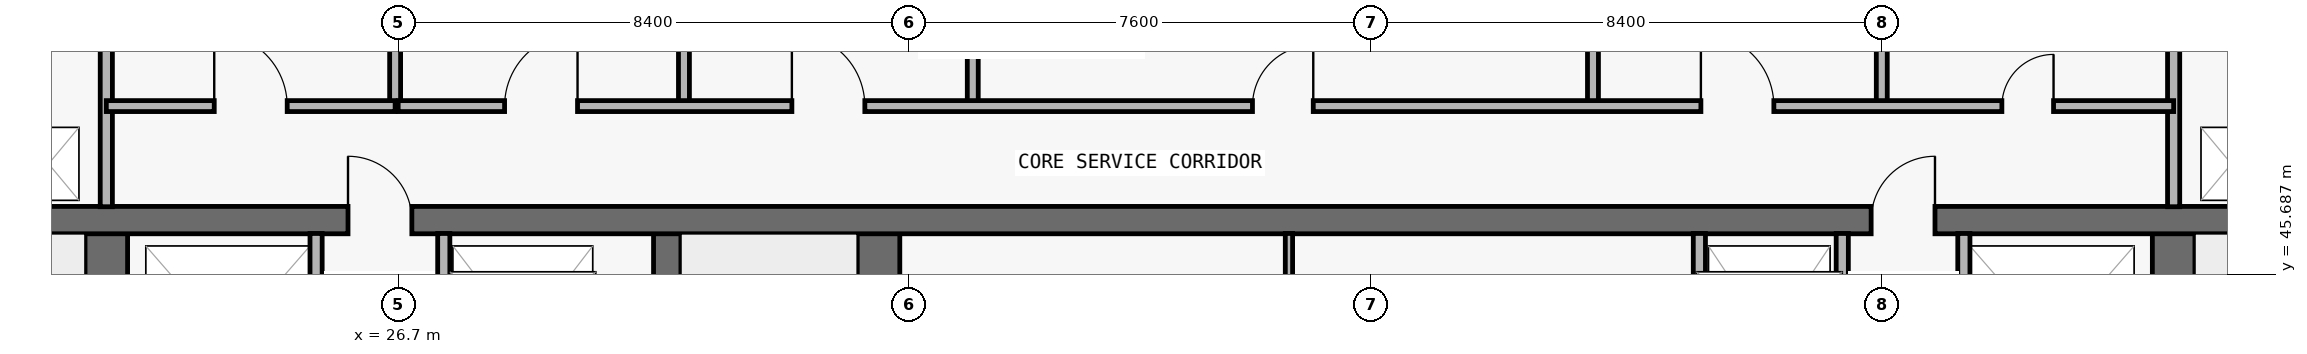
"""IFC4 building model, lengths in metres.
Left out: names, types, materials, properties, quantities, classifications, styles, units other than length and angle.
Written with IfcOpenShell. Run it as: python <this file> out.ifc"""

import sys

from ifc_helpers import new_model, si_unit, direction, frame, frame_2d, origin, place, context, subcontext, project, spatial, rectangle, extrude, element, fill, save


model = new_model("IFC4")
c1 = context("Model", 3, precision=1e-05, world=origin(), true_north=direction((0.0, 1.0)))
c2 = subcontext(c1, "Body", "Model", "MODEL_VIEW")
j1 = project(units=[si_unit("LENGTHUNIT", "METRE"), si_unit("PLANEANGLEUNIT", "RADIAN")], contexts=[c1])
p1 = place(None, origin())
s1 = spatial("IfcSite", under=j1, at=p1, CompositionType="ELEMENT")
p2 = place(p1, origin())
s2 = spatial("IfcBuilding", under=s1, at=p2, CompositionType="ELEMENT")
p3 = place(p2, frame((0.0, 0.0, 252.9)))
s3 = spatial("IfcBuildingStorey", under=s2, at=p3, CompositionType="ELEMENT", Elevation=252.9)
p4 = place(p3, frame((21.9, 37.0, 0.0), z_axis=(0.0, 0.0, 1.0), x_axis=(0.0, 1.0, 0.0)))
e1 = element("IfcWall", 1, at=p4, inside=s3, PredefinedType="SHEAR", context=c2, shape_type="SweptSolid", body=[
    extrude(rectangle(XDim=9.575, YDim=0.7, at=frame_2d((4.788, 0.0))), origin(), (0.0, 0.0, 1.0), 3.05),
])
p5 = place(p4, frame((0.55, 0.0, 0.0)))
e2 = element("IfcOpeningElement", 2, at=p5, cuts=e1, PredefinedType="OPENING", context=c2, shape_type="SweptSolid", body=[
    extrude(rectangle(XDim=1.1, YDim=2.15, at=frame_2d((0.55, 1.075))), frame((0.0, 0.36, 0.0), z_axis=(0.0, -1.0, 0.0), x_axis=(1.0, 0.0, 0.0)), (0.0, 0.0, 1.0), 0.72),
])
p6 = place(p3, frame((55.9, 37.0, 0.0), z_axis=(0.0, 0.0, 1.0), x_axis=(0.0, 1.0, 0.0)))
e3 = element("IfcWall", 3, at=p6, inside=s3, PredefinedType="SHEAR", context=c2, shape_type="SweptSolid", body=[
    extrude(rectangle(XDim=9.575, YDim=0.7, at=frame_2d((4.788, 0.0))), origin(), (0.0, 0.0, 1.0), 3.05),
])
p7 = place(p6, frame((0.55, 0.0, 0.0)))
e4 = element("IfcOpeningElement", 4, at=p7, cuts=e3, PredefinedType="OPENING", context=c2, shape_type="SweptSolid", body=[
    extrude(rectangle(XDim=1.1, YDim=2.15, at=frame_2d((0.55, 1.075))), frame((0.0, 0.36, 0.0), z_axis=(0.0, -1.0, 0.0), x_axis=(1.0, 0.0, 0.0)), (0.0, 0.0, 1.0), 0.72),
])
p8 = place(p3, frame((31.125, 37.0, 0.0), z_axis=(0.0, 0.0, 1.0), x_axis=(0.0, 1.0, 0.0)))
e5 = element("IfcWall", 5, at=p8, inside=s3, PredefinedType="SHEAR", context=c2, shape_type="SweptSolid", body=[
    extrude(rectangle(XDim=9.575, YDim=0.45, at=frame_2d((4.788, 0.0))), origin(), (0.0, 0.0, 1.0), 3.05),
])
p9 = place(p3, frame((34.6, 37.0, 0.0), z_axis=(0.0, 0.0, 1.0), x_axis=(0.0, 1.0, 0.0)))
e6 = element("IfcWall", 6, at=p9, inside=s3, PredefinedType="SHEAR", context=c2, shape_type="SweptSolid", body=[
    extrude(rectangle(XDim=9.575, YDim=0.7, at=frame_2d((4.788, 0.0))), origin(), (0.0, 0.0, 1.0), 3.05),
])
p10 = place(p3, frame((18.3, 46.575, 0.0), z_axis=(0.0, 0.0, 1.0), x_axis=(1.0, 0.0, 0.0)))
e7 = element("IfcWall", 7, at=p10, inside=s3, PredefinedType="SHEAR", context=c2, shape_type="SweptSolid", body=[
    extrude(rectangle(XDim=41.2, YDim=0.45, at=frame_2d((20.6, 0.0))), origin(), (0.0, 0.0, 1.0), 3.05),
])
p11 = place(p10, frame((7.575, 0.0, 0.0)))
e8 = element("IfcOpeningElement", 8, at=p11, cuts=e7, PredefinedType="OPENING", context=c2, shape_type="SweptSolid", body=[
    extrude(rectangle(XDim=1.05, YDim=2.15, at=frame_2d((0.525, 1.075))), frame((0.0, 0.235, 0.0), z_axis=(0.0, -1.0, 0.0), x_axis=(1.0, 0.0, 0.0)), (0.0, 0.0, 1.0), 0.47),
])
p12 = place(p10, frame((32.625, 0.0, 0.0)))
e9 = element("IfcOpeningElement", 9, at=p12, cuts=e7, PredefinedType="OPENING", context=c2, shape_type="SweptSolid", body=[
    extrude(rectangle(XDim=1.05, YDim=2.15, at=frame_2d((0.525, 1.075))), frame((0.0, 0.235, 0.0), z_axis=(0.0, -1.0, 0.0), x_axis=(1.0, 0.0, 0.0)), (0.0, 0.0, 1.0), 0.47),
])
p13 = place(p3, frame((21.9, 46.795, 0.0), z_axis=(0.0, 0.0, 1.0), x_axis=(0.0, 1.0, 0.0)))
e10 = element("IfcWall", 10, at=p13, inside=s3, PredefinedType="PARTITIONING", context=c2, shape_type="SweptSolid", body=[
    extrude(rectangle(XDim=3.16, YDim=0.2, at=frame_2d((1.58, 0.0))), origin(), (0.0, 0.0, 1.0), 3.05),
])
p14 = place(p3, frame((25.35, 43.17, 0.0), z_axis=(0.0, 0.0, 1.0), x_axis=(0.0, 1.0, 0.0)))
e11 = element("IfcWall", 11, at=p14, inside=s3, PredefinedType="PARTITIONING", context=c2, shape_type="SweptSolid", body=[
    extrude(rectangle(XDim=3.185, YDim=0.2, at=frame_2d((1.593, 0.0))), origin(), (0.0, 0.0, 1.0), 3.05),
])
p15 = place(p3, frame((26.65, 48.45, 0.0), z_axis=(0.0, 0.0, 1.0), x_axis=(0.0, 1.0, 0.0)))
e12 = element("IfcWall", 12, at=p15, inside=s3, PredefinedType="PARTITIONING", context=c2, shape_type="SweptSolid", body=[
    extrude(rectangle(XDim=1.505, YDim=0.18, at=frame_2d((0.752, 0.0))), origin(), (0.0, 0.0, 1.0), 3.05),
])
p16 = place(p3, frame((27.45, 43.17, 0.0), z_axis=(0.0, 0.0, 1.0), x_axis=(0.0, 1.0, 0.0)))
e13 = element("IfcWall", 13, at=p16, inside=s3, PredefinedType="PARTITIONING", context=c2, shape_type="SweptSolid", body=[
    extrude(rectangle(XDim=3.185, YDim=0.2, at=frame_2d((1.593, 0.0))), origin(), (0.0, 0.0, 1.0), 3.05),
])
for number, where, z_axis, x_axis in (
    (14, (31.4, 48.45, 0.0), (0.0, 0.0, 1.0), (0.0, 1.0, 0.0)),
    (15, (36.15, 48.45, 0.0), (0.0, 0.0, 1.0), (0.0, 1.0, 0.0)),
):
    element("IfcWall", number, at=place(p3, frame(where, z_axis=z_axis, x_axis=x_axis)), inside=s3, PredefinedType="PARTITIONING", context=c2, shape_type="SweptSolid", body=[
        extrude(rectangle(XDim=1.505, YDim=0.18, at=frame_2d((0.752, 0.0))), origin(), (0.0, 0.0, 1.0), 3.05),
    ])
p17 = place(p3, frame((41.35, 43.17, 0.0), z_axis=(0.0, 0.0, 1.0), x_axis=(0.0, 1.0, 0.0)))
e16 = element("IfcWall", 16, at=p17, inside=s3, PredefinedType="PARTITIONING", context=c2, shape_type="SweptSolid", body=[
    extrude(rectangle(XDim=3.185, YDim=0.12, at=frame_2d((1.593, 0.0))), origin(), (0.0, 0.0, 1.0), 3.05),
])
p18 = place(p3, frame((46.35, 48.45, 0.0), z_axis=(0.0, 0.0, 1.0), x_axis=(0.0, 1.0, 0.0)))
e17 = element("IfcWall", 17, at=p18, inside=s3, PredefinedType="PARTITIONING", context=c2, shape_type="SweptSolid", body=[
    extrude(rectangle(XDim=1.505, YDim=0.18, at=frame_2d((0.752, 0.0))), origin(), (0.0, 0.0, 1.0), 3.05),
])
for number, where, z_axis, x_axis in (
    (18, (48.1, 43.17, 0.0), (0.0, 0.0, 1.0), (0.0, 1.0, 0.0)),
    (19, (50.45, 43.17, 0.0), (0.0, 0.0, 1.0), (0.0, 1.0, 0.0)),
):
    element("IfcWall", number, at=place(p3, frame(where, z_axis=z_axis, x_axis=x_axis)), inside=s3, PredefinedType="PARTITIONING", context=c2, shape_type="SweptSolid", body=[
        extrude(rectangle(XDim=3.185, YDim=0.2, at=frame_2d((1.593, 0.0))), origin(), (0.0, 0.0, 1.0), 3.05),
    ])
p19 = place(p3, frame((51.1, 48.45, 0.0), z_axis=(0.0, 0.0, 1.0), x_axis=(0.0, 1.0, 0.0)))
e20 = element("IfcWall", 20, at=p19, inside=s3, PredefinedType="PARTITIONING", context=c2, shape_type="SweptSolid", body=[
    extrude(rectangle(XDim=1.505, YDim=0.18, at=frame_2d((0.752, 0.0))), origin(), (0.0, 0.0, 1.0), 3.05),
])
p20 = place(p3, frame((52.45, 43.17, 0.0), z_axis=(0.0, 0.0, 1.0), x_axis=(0.0, 1.0, 0.0)))
e21 = element("IfcWall", 21, at=p20, inside=s3, PredefinedType="PARTITIONING", context=c2, shape_type="SweptSolid", body=[
    extrude(rectangle(XDim=3.185, YDim=0.2, at=frame_2d((1.593, 0.0))), origin(), (0.0, 0.0, 1.0), 3.05),
])
p21 = place(p3, frame((55.9, 46.795, 0.0), z_axis=(0.0, 0.0, 1.0), x_axis=(0.0, 1.0, 0.0)))
e22 = element("IfcWall", 22, at=p21, inside=s3, PredefinedType="PARTITIONING", context=c2, shape_type="SweptSolid", body=[
    extrude(rectangle(XDim=3.16, YDim=0.2, at=frame_2d((1.58, 0.0))), origin(), (0.0, 0.0, 1.0), 3.05),
])
p22 = place(p3, frame((21.9, 48.45, 0.0), z_axis=(0.0, 0.0, 1.0), x_axis=(1.0, 0.0, 0.0)))
e23 = element("IfcWall", 23, at=p22, inside=s3, PredefinedType="PARTITIONING", context=c2, shape_type="SweptSolid", body=[
    extrude(rectangle(XDim=4.75, YDim=0.18, at=frame_2d((2.375, 0.0))), origin(), (0.0, 0.0, 1.0), 3.05),
])
p23 = place(p22, frame((1.775, 0.0, 0.0)))
e24 = element("IfcOpeningElement", 24, at=p23, cuts=e23, PredefinedType="OPENING", context=c2, shape_type="SweptSolid", body=[
    extrude(rectangle(XDim=1.2, YDim=2.2, at=frame_2d((0.6, 1.1))), frame((0.0, 0.1, 0.0), z_axis=(0.0, -1.0, 0.0), x_axis=(1.0, 0.0, 0.0)), (0.0, 0.0, 1.0), 0.2),
])
p24 = place(p3, frame((26.7, 48.45, 0.0), z_axis=(0.0, 0.0, 1.0), x_axis=(1.0, 0.0, 0.0)))
e25 = element("IfcWall", 25, at=p24, inside=s3, PredefinedType="PARTITIONING", context=c2, shape_type="SweptSolid", body=[
    extrude(rectangle(XDim=29.2, YDim=0.18, at=frame_2d((14.6, 0.0))), origin(), (0.0, 0.0, 1.0), 3.05),
])
p25 = place(p24, frame((1.75, 0.0, 0.0)))
e26 = element("IfcOpeningElement", 26, at=p25, cuts=e25, PredefinedType="OPENING", context=c2, shape_type="SweptSolid", body=[
    extrude(rectangle(XDim=1.2, YDim=2.2, at=frame_2d((0.6, 1.1))), frame((0.0, 0.1, 0.0), z_axis=(0.0, -1.0, 0.0), x_axis=(1.0, 0.0, 0.0)), (0.0, 0.0, 1.0), 0.2),
])
p26 = place(p24, frame((6.475, 0.0, 0.0)))
e27 = element("IfcOpeningElement", 27, at=p26, cuts=e25, PredefinedType="OPENING", context=c2, shape_type="SweptSolid", body=[
    extrude(rectangle(XDim=1.2, YDim=2.2, at=frame_2d((0.6, 1.1))), frame((0.0, 0.1, 0.0), z_axis=(0.0, -1.0, 0.0), x_axis=(1.0, 0.0, 0.0)), (0.0, 0.0, 1.0), 0.2),
])
p27 = place(p24, frame((14.05, 0.0, 0.0)))
e28 = element("IfcOpeningElement", 28, at=p27, cuts=e25, PredefinedType="OPENING", context=c2, shape_type="SweptSolid", body=[
    extrude(rectangle(XDim=1.0, YDim=2.2, at=frame_2d((0.5, 1.1))), frame((0.0, 0.1, 0.0), z_axis=(0.0, -1.0, 0.0), x_axis=(1.0, 0.0, 0.0)), (0.0, 0.0, 1.0), 0.2),
])
p28 = place(p24, frame((21.425, 0.0, 0.0)))
e29 = element("IfcOpeningElement", 29, at=p28, cuts=e25, PredefinedType="OPENING", context=c2, shape_type="SweptSolid", body=[
    extrude(rectangle(XDim=1.2, YDim=2.2, at=frame_2d((0.6, 1.1))), frame((0.0, 0.1, 0.0), z_axis=(0.0, -1.0, 0.0), x_axis=(1.0, 0.0, 0.0)), (0.0, 0.0, 1.0), 0.2),
])
p29 = place(p24, frame((26.375, 0.0, 0.0)))
e30 = element("IfcOpeningElement", 30, at=p29, cuts=e25, PredefinedType="OPENING", context=c2, shape_type="SweptSolid", body=[
    extrude(rectangle(XDim=0.85, YDim=2.1, at=frame_2d((0.425, 1.05))), frame((0.0, 0.1, 0.0), z_axis=(0.0, -1.0, 0.0), x_axis=(1.0, 0.0, 0.0)), (0.0, 0.0, 1.0), 0.2),
])
p30 = place(p11, origin())
e31 = element("IfcDoor", 31, at=p30, inside=s3, OperationType="SINGLE_SWING_LEFT", PredefinedType="DOOR", context=c2, shape_type="SweptSolid", body=[
    extrude(rectangle(XDim=1.05, YDim=2.15, at=frame_2d((0.525, 1.075))), frame((0.0, 0.025, 0.0), z_axis=(0.0, -1.0, 0.0), x_axis=(1.0, 0.0, 0.0)), (0.0, 0.0, 1.0), 0.05),
])
fill(e8, e31)
p31 = place(p12, origin())
e32 = element("IfcDoor", 32, at=p31, inside=s3, OperationType="SINGLE_SWING_RIGHT", PredefinedType="DOOR", context=c2, shape_type="SweptSolid", body=[
    extrude(rectangle(XDim=1.05, YDim=2.15, at=frame_2d((0.525, 1.075))), frame((0.0, 0.025, 0.0), z_axis=(0.0, -1.0, 0.0), x_axis=(1.0, 0.0, 0.0)), (0.0, 0.0, 1.0), 0.05),
])
fill(e9, e32)
p32 = place(p23, origin())
e33 = element("IfcDoor", 33, at=p32, inside=s3, OperationType="SINGLE_SWING_LEFT", PredefinedType="DOOR", context=c2, shape_type="SweptSolid", body=[
    extrude(rectangle(XDim=1.2, YDim=2.2, at=frame_2d((0.6, 1.1))), frame((0.0, 0.025, 0.0), z_axis=(0.0, -1.0, 0.0), x_axis=(1.0, 0.0, 0.0)), (0.0, 0.0, 1.0), 0.05),
])
fill(e24, e33)
p33 = place(p25, origin())
e34 = element("IfcDoor", 34, at=p33, inside=s3, OperationType="SINGLE_SWING_RIGHT", PredefinedType="DOOR", context=c2, shape_type="SweptSolid", body=[
    extrude(rectangle(XDim=1.2, YDim=2.2, at=frame_2d((0.6, 1.1))), frame((0.0, 0.025, 0.0), z_axis=(0.0, -1.0, 0.0), x_axis=(1.0, 0.0, 0.0)), (0.0, 0.0, 1.0), 0.05),
])
fill(e26, e34)
p34 = place(p26, origin())
e35 = element("IfcDoor", 35, at=p34, inside=s3, OperationType="SINGLE_SWING_LEFT", PredefinedType="DOOR", context=c2, shape_type="SweptSolid", body=[
    extrude(rectangle(XDim=1.2, YDim=2.2, at=frame_2d((0.6, 1.1))), frame((0.0, 0.025, 0.0), z_axis=(0.0, -1.0, 0.0), x_axis=(1.0, 0.0, 0.0)), (0.0, 0.0, 1.0), 0.05),
])
fill(e27, e35)
p35 = place(p27, origin())
e36 = element("IfcDoor", 36, at=p35, inside=s3, OperationType="SINGLE_SWING_RIGHT", PredefinedType="DOOR", context=c2, shape_type="SweptSolid", body=[
    extrude(rectangle(XDim=1.0, YDim=2.2, at=frame_2d((0.5, 1.1))), frame((0.0, 0.025, 0.0), z_axis=(0.0, -1.0, 0.0), x_axis=(1.0, 0.0, 0.0)), (0.0, 0.0, 1.0), 0.05),
])
fill(e28, e36)
p36 = place(p28, origin())
e37 = element("IfcDoor", 37, at=p36, inside=s3, OperationType="SINGLE_SWING_LEFT", PredefinedType="DOOR", context=c2, shape_type="SweptSolid", body=[
    extrude(rectangle(XDim=1.2, YDim=2.2, at=frame_2d((0.6, 1.1))), frame((0.0, 0.025, 0.0), z_axis=(0.0, -1.0, 0.0), x_axis=(1.0, 0.0, 0.0)), (0.0, 0.0, 1.0), 0.05),
])
fill(e29, e37)
p37 = place(p29, origin())
e38 = element("IfcDoor", 38, at=p37, inside=s3, OperationType="SINGLE_SWING_RIGHT", PredefinedType="DOOR", context=c2, shape_type="SweptSolid", body=[
    extrude(rectangle(XDim=0.85, YDim=2.1, at=frame_2d((0.425, 1.05))), frame((0.0, 0.025, 0.0), z_axis=(0.0, -1.0, 0.0), x_axis=(1.0, 0.0, 0.0)), (0.0, 0.0, 1.0), 0.05),
])
fill(e30, e38)
save(model, sys.argv[1])
